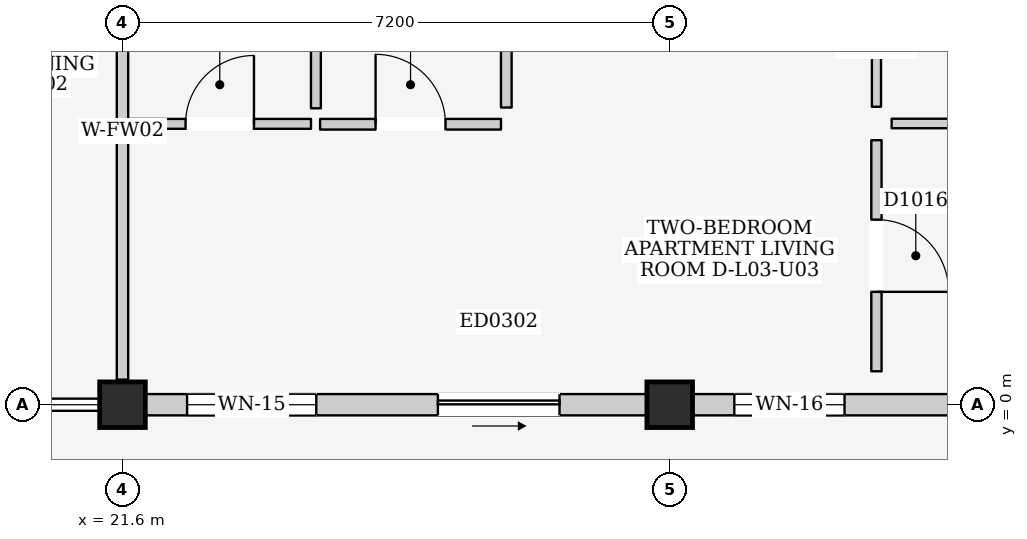
"""IFC4 building model, lengths in metres.
Left out: names, types, materials, properties, quantities, classifications, styles, units other than length and angle.
Written with IfcOpenShell. Run it as: python <this file> out.ifc"""

import sys

from ifc_helpers import new_model, si_unit, direction, frame, frame_2d, origin, origin_2d, place, context, subcontext, project, spatial, rectangle, extrude, element, fill, save


model = new_model("IFC4")
c1 = context("Model", 3, precision=1e-05, world=origin(), true_north=direction((0.0, 1.0)))
c2 = subcontext(c1, "Body", "Model", "MODEL_VIEW")
j1 = project(units=[si_unit("LENGTHUNIT", "METRE"), si_unit("PLANEANGLEUNIT", "RADIAN")], contexts=[c1])
p1 = place(None, origin())
s1 = spatial("IfcSite", under=j1, at=p1, CompositionType="ELEMENT")
p2 = place(p1, origin())
s2 = spatial("IfcBuilding", under=s1, at=p2, CompositionType="ELEMENT")
p3 = place(p2, frame((0.0, 0.0, 12.2)))
s3 = spatial("IfcBuildingStorey", under=s2, at=p3, CompositionType="ELEMENT", Elevation=12.2)
for number, where, z_axis, x_axis in (
    (1, (21.6, 0.0, 0.0), (0.0, 0.0, 1.0), (1.0, 0.0, 0.0)),
    (2, (28.8, 0.0, 0.0), (0.0, 0.0, 1.0), (1.0, 0.0, 0.0)),
):
    element("IfcColumn", number, at=place(p3, frame(where, z_axis=z_axis, x_axis=x_axis)), inside=s3, PredefinedType="COLUMN", context=c2, shape_type="SweptSolid", body=[
        extrude(rectangle(XDim=0.6, YDim=0.6, at=origin_2d()), origin(), (0.0, 0.0, 1.0), 3.2),
    ])
p4 = place(p3, frame((21.9, 0.0, 0.0), z_axis=(0.0, 0.0, 1.0), x_axis=(1.0, 0.0, 0.0)))
e3 = element("IfcWall", 3, at=p4, inside=s3, PredefinedType="ELEMENTEDWALL", context=c2, shape_type="SweptSolid", body=[
    extrude(rectangle(XDim=6.6, YDim=0.28, at=frame_2d((3.3, 0.0))), origin(), (0.0, 0.0, 1.0), 2.445),
])
p5 = place(p4, frame((3.85, 0.0, 0.0)))
e4 = element("IfcOpeningElement", 4, at=p5, cuts=e3, PredefinedType="OPENING", context=c2, shape_type="SweptSolid", body=[
    extrude(rectangle(XDim=1.6, YDim=2.12, at=frame_2d((0.8, 1.06))), frame((0.0, 0.155, 0.0), z_axis=(0.0, -1.0, 0.0), x_axis=(1.0, 0.0, 0.0)), (0.0, 0.0, 1.0), 0.31),
])
p6 = place(p4, frame((0.55, 0.0, 0.885)))
e5 = element("IfcOpeningElement", 5, at=p6, cuts=e3, PredefinedType="OPENING", context=c2, shape_type="SweptSolid", body=[
    extrude(rectangle(XDim=1.7, YDim=1.45, at=frame_2d((0.85, 0.725))), frame((0.0, 0.155, 0.0), z_axis=(0.0, -1.0, 0.0), x_axis=(1.0, 0.0, 0.0)), (0.0, 0.0, 1.0), 0.31),
])
p7 = place(p3, frame((29.1, 0.0, 0.0), z_axis=(0.0, 0.0, 1.0), x_axis=(1.0, 0.0, 0.0)))
e6 = element("IfcWall", 6, at=p7, inside=s3, PredefinedType="ELEMENTEDWALL", context=c2, shape_type="SweptSolid", body=[
    extrude(rectangle(XDim=6.6, YDim=0.28, at=frame_2d((3.3, 0.0))), origin(), (0.0, 0.0, 1.0), 2.445),
])
p8 = place(p7, frame((3.85, 0.0, 0.0)))
e7 = element("IfcOpeningElement", 7, at=p8, cuts=e6, PredefinedType="OPENING", context=c2, shape_type="SweptSolid", body=[
    extrude(rectangle(XDim=1.5, YDim=2.12, at=frame_2d((0.75, 1.06))), frame((0.0, 0.155, 0.0), z_axis=(0.0, -1.0, 0.0), x_axis=(1.0, 0.0, 0.0)), (0.0, 0.0, 1.0), 0.31),
])
p9 = place(p7, frame((0.55, 0.0, 0.9)))
e8 = element("IfcOpeningElement", 8, at=p9, cuts=e6, PredefinedType="OPENING", context=c2, shape_type="SweptSolid", body=[
    extrude(rectangle(XDim=1.45, YDim=1.4, at=frame_2d((0.725, 0.7))), frame((0.0, 0.155, 0.0), z_axis=(0.0, -1.0, 0.0), x_axis=(1.0, 0.0, 0.0)), (0.0, 0.0, 1.0), 0.31),
])
p10 = place(p3, frame((21.6, 0.33, 0.0), z_axis=(0.0, 0.0, 1.0), x_axis=(0.0, 1.0, 0.0)))
e9 = element("IfcWall", 9, at=p10, inside=s3, PredefinedType="PARTITIONING", context=c2, shape_type="SweptSolid", body=[
    extrude(rectangle(XDim=6.54, YDim=0.15, at=frame_2d((3.27, 0.0))), origin(), (0.0, 0.0, 1.0), 2.415),
])
p11 = place(p3, frame((21.68, 3.695, 0.0), z_axis=(0.0, 0.0, 1.0), x_axis=(1.0, 0.0, 0.0)))
e10 = element("IfcWall", 10, at=p11, inside=s3, PredefinedType="PARTITIONING", context=c2, shape_type="SweptSolid", body=[
    extrude(rectangle(XDim=2.4, YDim=0.13, at=frame_2d((1.2, 0.0))), origin(), (0.0, 0.0, 1.0), 2.98),
])
p12 = place(p11, frame((0.75, 0.0, 0.0)))
e11 = element("IfcOpeningElement", 11, at=p12, cuts=e10, PredefinedType="OPENING", context=c2, shape_type="SweptSolid", body=[
    extrude(rectangle(XDim=0.9, YDim=2.1, at=frame_2d((0.45, 1.05))), frame((0.0, 0.08, 0.0), z_axis=(0.0, -1.0, 0.0), x_axis=(1.0, 0.0, 0.0)), (0.0, 0.0, 1.0), 0.16),
])
p13 = place(p3, frame((24.145, 3.9, 0.0), z_axis=(0.0, 0.0, 1.0), x_axis=(0.0, 1.0, 0.0)))
e12 = element("IfcWall", 12, at=p13, inside=s3, PredefinedType="PARTITIONING", context=c2, shape_type="SweptSolid", body=[
    extrude(rectangle(XDim=3.04, YDim=0.13, at=frame_2d((1.52, 0.0))), origin(), (0.0, 0.0, 1.0), 2.98),
])
p14 = place(p3, frame((24.2, 3.69, 0.0), z_axis=(0.0, 0.0, 1.0), x_axis=(1.0, 0.0, 0.0)))
e13 = element("IfcWall", 13, at=p14, inside=s3, PredefinedType="PARTITIONING", context=c2, shape_type="SweptSolid", body=[
    extrude(rectangle(XDim=2.38, YDim=0.14, at=frame_2d((1.19, 0.0))), origin(), (0.0, 0.0, 1.0), 2.98),
])
p15 = place(p14, frame((0.73, 0.0, 0.0)))
e14 = element("IfcOpeningElement", 14, at=p15, cuts=e13, PredefinedType="OPENING", context=c2, shape_type="SweptSolid", body=[
    extrude(rectangle(XDim=0.92, YDim=2.1, at=frame_2d((0.46, 1.05))), frame((0.0, 0.085, 0.0), z_axis=(0.0, -1.0, 0.0), x_axis=(1.0, 0.0, 0.0)), (0.0, 0.0, 1.0), 0.17),
])
p16 = place(p3, frame((26.65, 3.91, 0.0), z_axis=(0.0, 0.0, 1.0), x_axis=(0.0, 1.0, 0.0)))
e15 = element("IfcWall", 15, at=p16, inside=s3, PredefinedType="PARTITIONING", context=c2, shape_type="SweptSolid", body=[
    extrude(rectangle(XDim=3.06, YDim=0.14, at=frame_2d((1.53, 0.0))), origin(), (0.0, 0.0, 1.0), 2.98),
])
p17 = place(p3, frame((31.52, 0.44, 0.0), z_axis=(0.0, 0.0, 1.0), x_axis=(0.0, 1.0, 0.0)))
e16 = element("IfcWall", 16, at=p17, inside=s3, PredefinedType="PARTITIONING", context=c2, shape_type="SweptSolid", body=[
    extrude(rectangle(XDim=3.04, YDim=0.135, at=frame_2d((1.52, 0.0))), origin(), (0.0, 0.0, 1.0), 2.98),
])
p18 = place(p17, frame((1.045, 0.0, 0.0)))
e17 = element("IfcOpeningElement", 17, at=p18, cuts=e16, PredefinedType="OPENING", context=c2, shape_type="SweptSolid", body=[
    extrude(rectangle(XDim=0.95, YDim=2.15, at=frame_2d((0.475, 1.075))), frame((0.0, 0.083, 0.0), z_axis=(0.0, -1.0, 0.0), x_axis=(1.0, 0.0, 0.0)), (0.0, 0.0, 1.0), 0.165),
])
p19 = place(p3, frame((31.72, 3.7, 0.0), z_axis=(0.0, 0.0, 1.0), x_axis=(1.0, 0.0, 0.0)))
e18 = element("IfcWall", 18, at=p19, inside=s3, PredefinedType="PARTITIONING", context=c2, shape_type="SweptSolid", body=[
    extrude(rectangle(XDim=4.06, YDim=0.125, at=frame_2d((2.03, 0.0))), origin(), (0.0, 0.0, 1.0), 2.98),
])
p20 = place(p3, frame((31.52, 3.92, 0.0), z_axis=(0.0, 0.0, 1.0), x_axis=(0.0, 1.0, 0.0)))
e19 = element("IfcWall", 19, at=p20, inside=s3, PredefinedType="PARTITIONING", context=c2, shape_type="SweptSolid", body=[
    extrude(rectangle(XDim=3.04, YDim=0.12, at=frame_2d((1.52, 0.0))), origin(), (0.0, 0.0, 1.0), 2.98),
])
p21 = place(p20, frame((1.04, 0.0, 0.0)))
e20 = element("IfcOpeningElement", 20, at=p21, cuts=e19, PredefinedType="OPENING", context=c2, shape_type="SweptSolid", body=[
    extrude(rectangle(XDim=0.96, YDim=2.15, at=frame_2d((0.48, 1.075))), frame((0.0, 0.075, 0.0), z_axis=(0.0, -1.0, 0.0), x_axis=(1.0, 0.0, 0.0)), (0.0, 0.0, 1.0), 0.15),
])
p22 = place(p5, frame((1.6, 0.0, 0.0), z_axis=(0.0, 0.0, 1.0), x_axis=(-1.0, 0.0, 0.0)))
e21 = element("IfcDoor", 21, at=p22, inside=s3, OperationType="SLIDING_TO_RIGHT", PredefinedType="DOOR", context=c2, shape_type="SweptSolid", body=[
    extrude(rectangle(XDim=1.6, YDim=2.12, at=frame_2d((0.8, 1.06))), frame((0.0, 0.025, 0.0), z_axis=(0.0, -1.0, 0.0), x_axis=(1.0, 0.0, 0.0)), (0.0, 0.0, 1.0), 0.05),
])
fill(e4, e21)
p23 = place(p6, origin())
e22 = element("IfcWindow", 22, at=p23, inside=s3, PartitioningType="DOUBLE_PANEL_VERTICAL", PredefinedType="WINDOW", context=c2, shape_type="SweptSolid", body=[
    extrude(rectangle(XDim=1.7, YDim=1.45, at=frame_2d((0.85, 0.725))), frame((0.0, 0.03, 0.0), z_axis=(0.0, -1.0, 0.0), x_axis=(1.0, 0.0, 0.0)), (0.0, 0.0, 1.0), 0.06),
])
fill(e5, e22)
p24 = place(p9, origin())
e23 = element("IfcWindow", 23, at=p24, inside=s3, PartitioningType="DOUBLE_PANEL_VERTICAL", PredefinedType="WINDOW", context=c2, shape_type="SweptSolid", body=[
    extrude(rectangle(XDim=1.45, YDim=1.4, at=frame_2d((0.725, 0.7))), frame((0.0, 0.03, 0.0), z_axis=(0.0, -1.0, 0.0), x_axis=(1.0, 0.0, 0.0)), (0.0, 0.0, 1.0), 0.06),
])
fill(e8, e23)
p25 = place(p12, origin())
e24 = element("IfcDoor", 24, at=p25, inside=s3, OperationType="SINGLE_SWING_RIGHT", PredefinedType="DOOR", context=c2, shape_type="SweptSolid", body=[
    extrude(rectangle(XDim=0.9, YDim=2.1, at=frame_2d((0.45, 1.05))), frame((0.0, 0.025, 0.0), z_axis=(0.0, -1.0, 0.0), x_axis=(1.0, 0.0, 0.0)), (0.0, 0.0, 1.0), 0.05),
])
fill(e11, e24)
p26 = place(p15, origin())
e25 = element("IfcDoor", 25, at=p26, inside=s3, OperationType="SINGLE_SWING_LEFT", PredefinedType="DOOR", context=c2, shape_type="SweptSolid", body=[
    extrude(rectangle(XDim=0.92, YDim=2.1, at=frame_2d((0.46, 1.05))), frame((0.0, 0.025, 0.0), z_axis=(0.0, -1.0, 0.0), x_axis=(1.0, 0.0, 0.0)), (0.0, 0.0, 1.0), 0.05),
])
fill(e14, e25)
p27 = place(p18, frame((0.95, 0.0, 0.0), z_axis=(0.0, 0.0, 1.0), x_axis=(-1.0, 0.0, 0.0)))
e26 = element("IfcDoor", 26, at=p27, inside=s3, OperationType="SINGLE_SWING_RIGHT", PredefinedType="DOOR", context=c2, shape_type="SweptSolid", body=[
    extrude(rectangle(XDim=0.95, YDim=2.15, at=frame_2d((0.475, 1.075))), frame((0.0, 0.025, 0.0), z_axis=(0.0, -1.0, 0.0), x_axis=(1.0, 0.0, 0.0)), (0.0, 0.0, 1.0), 0.05),
])
fill(e17, e26)
save(model, sys.argv[1])
